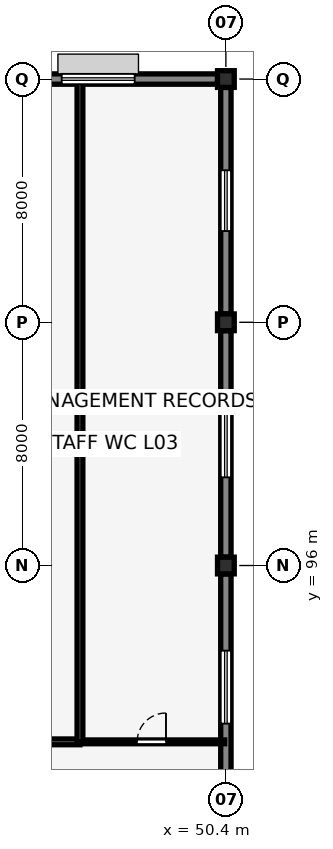
"""IFC4 building model, lengths in metres.
Left out: names, types, materials, properties, quantities, classifications, styles, units other than length and angle.
Written with IfcOpenShell. Run it as: python <this file> out.ifc"""

import sys

from ifc_helpers import new_model, si_unit, direction, frame, frame_2d, origin, origin_2d, place, context, subcontext, project, spatial, rectangle, extrude, element, fill, save


model = new_model("IFC4")
c1 = context("Model", 3, precision=1e-05, world=origin(), true_north=direction((0.0, 1.0)))
c2 = subcontext(c1, "Body", "Model", "MODEL_VIEW")
j1 = project(units=[si_unit("LENGTHUNIT", "METRE"), si_unit("PLANEANGLEUNIT", "RADIAN")], contexts=[c1])
p1 = place(None, origin())
s1 = spatial("IfcSite", under=j1, at=p1, CompositionType="ELEMENT")
p2 = place(p1, origin())
s2 = spatial("IfcBuilding", under=s1, at=p2, CompositionType="ELEMENT")
p3 = place(p2, frame((0.0, 0.0, 13.36)))
s3 = spatial("IfcBuildingStorey", under=s2, at=p3, CompositionType="ELEMENT", Elevation=13.36)
for number, where, z_axis, x_axis in (
    (1, (50.4, 96.0, 0.0), (0.0, 0.0, 1.0), (1.0, 0.0, 0.0)),
    (2, (50.4, 104.0, 0.0), (0.0, 0.0, 1.0), (1.0, 0.0, 0.0)),
    (3, (50.4, 112.0, 0.0), (0.0, 0.0, 1.0), (1.0, 0.0, 0.0)),
):
    element("IfcColumn", number, at=place(p3, frame(where, z_axis=z_axis, x_axis=x_axis)), inside=s3, PredefinedType="COLUMN", context=c2, shape_type="SweptSolid", body=[
        extrude(rectangle(XDim=0.55, YDim=0.55, at=origin_2d()), origin(), (0.0, 0.0, 1.0), 3.58),
    ])
p4 = place(p3, frame((42.275, 112.0, 0.0), z_axis=(0.0, 0.0, 1.0), x_axis=(1.0, 0.0, 0.0)))
e4 = element("IfcWall", 4, at=p4, inside=s3, PredefinedType="SOLIDWALL", context=c2, shape_type="SweptSolid", body=[
    extrude(rectangle(XDim=7.85, YDim=0.34, at=frame_2d((3.925, 0.0))), origin(), (0.0, 0.0, 1.0), 3.28),
])
p5 = place(p4, frame((2.725, 0.0, 0.9), z_axis=(0.0, 0.0, 1.0), x_axis=(1.0, 0.0, 0.0)))
e5 = element("IfcOpeningElement", 5, at=p5, cuts=e4, PredefinedType="OPENING", context=c2, shape_type="SweptSolid", body=[
    extrude(rectangle(XDim=2.4, YDim=1.75, at=frame_2d((1.2, 0.875))), frame((0.0, 0.18, 0.0), z_axis=(0.0, -1.0, 0.0), x_axis=(1.0, 0.0, 0.0)), (0.0, 0.0, 1.0), 0.36),
])
p6 = place(p3, frame((50.4, 88.275, 0.0), z_axis=(0.0, 0.0, 1.0), x_axis=(0.0, 1.0, 0.0)))
e6 = element("IfcWall", 6, at=p6, inside=s3, PredefinedType="SOLIDWALL", context=c2, shape_type="SweptSolid", body=[
    extrude(rectangle(XDim=7.45, YDim=0.34, at=frame_2d((3.725, 0.0))), origin(), (0.0, 0.0, 1.0), 3.28),
])
p7 = place(p6, frame((2.525, 0.0, 0.9), z_axis=(0.0, 0.0, 1.0), x_axis=(1.0, 0.0, 0.0)))
e7 = element("IfcOpeningElement", 7, at=p7, cuts=e6, PredefinedType="OPENING", context=c2, shape_type="SweptSolid", body=[
    extrude(rectangle(XDim=2.4, YDim=1.5, at=frame_2d((1.2, 0.75))), frame((0.0, 0.18, 0.0), z_axis=(0.0, -1.0, 0.0), x_axis=(1.0, 0.0, 0.0)), (0.0, 0.0, 1.0), 0.36),
])
p8 = place(p3, frame((50.4, 96.275, 0.0), z_axis=(0.0, 0.0, 1.0), x_axis=(0.0, 1.0, 0.0)))
e8 = element("IfcWall", 8, at=p8, inside=s3, PredefinedType="SOLIDWALL", context=c2, shape_type="SweptSolid", body=[
    extrude(rectangle(XDim=7.45, YDim=0.34, at=frame_2d((3.725, 0.0))), origin(), (0.0, 0.0, 1.0), 3.28),
])
p9 = place(p8, frame((2.625, 0.0, 0.9), z_axis=(0.0, 0.0, 1.0), x_axis=(1.0, 0.0, 0.0)))
e9 = element("IfcOpeningElement", 9, at=p9, cuts=e8, PredefinedType="OPENING", context=c2, shape_type="SweptSolid", body=[
    extrude(rectangle(XDim=2.2, YDim=1.5, at=frame_2d((1.1, 0.75))), frame((0.0, 0.18, 0.0), z_axis=(0.0, -1.0, 0.0), x_axis=(1.0, 0.0, 0.0)), (0.0, 0.0, 1.0), 0.36),
])
p10 = place(p3, frame((50.4, 104.275, 0.0), z_axis=(0.0, 0.0, 1.0), x_axis=(0.0, 1.0, 0.0)))
e10 = element("IfcWall", 10, at=p10, inside=s3, PredefinedType="SOLIDWALL", context=c2, shape_type="SweptSolid", body=[
    extrude(rectangle(XDim=7.45, YDim=0.34, at=frame_2d((3.725, 0.0))), origin(), (0.0, 0.0, 1.0), 3.28),
])
p11 = place(p10, frame((2.725, 0.0, 0.9), z_axis=(0.0, 0.0, 1.0), x_axis=(1.0, 0.0, 0.0)))
e11 = element("IfcOpeningElement", 11, at=p11, cuts=e10, PredefinedType="OPENING", context=c2, shape_type="SweptSolid", body=[
    extrude(rectangle(XDim=2.0, YDim=1.5, at=frame_2d((1.0, 0.75))), frame((0.0, 0.18, 0.0), z_axis=(0.0, -1.0, 0.0), x_axis=(1.0, 0.0, 0.0)), (0.0, 0.0, 1.0), 0.36),
])
p12 = place(p3, frame((42.0, 90.2, 0.0), z_axis=(0.0, 0.0, 1.0), x_axis=(1.0, 0.0, 0.0)))
e12 = element("IfcWall", 12, at=p12, inside=s3, PredefinedType="PLUMBINGWALL", context=c2, shape_type="SweptSolid", body=[
    extrude(rectangle(XDim=3.6, YDim=0.19, at=frame_2d((1.8, 0.0))), origin(), (0.0, 0.0, 1.0), 3.58),
])
p13 = place(p12, frame((1.3, 0.0, 0.0), z_axis=(0.0, 0.0, 1.0), x_axis=(1.0, 0.0, 0.0)))
e13 = element("IfcOpeningElement", 13, at=p13, cuts=e12, PredefinedType="OPENING", context=c2, shape_type="SweptSolid", body=[
    extrude(rectangle(XDim=0.95, YDim=2.15, at=frame_2d((0.475, 1.075))), frame((0.0, 0.105, 0.0), z_axis=(0.0, -1.0, 0.0), x_axis=(1.0, 0.0, 0.0)), (0.0, 0.0, 1.0), 0.21),
])
p14 = place(p3, frame((45.6, 90.2, 0.0), z_axis=(0.0, 0.0, 1.0), x_axis=(1.0, 0.0, 0.0)))
e14 = element("IfcWall", 14, at=p14, inside=s3, PredefinedType="PARTITIONING", context=c2, shape_type="SweptSolid", body=[
    extrude(rectangle(XDim=4.76, YDim=0.125, at=frame_2d((2.38, 0.0))), origin(), (0.0, 0.0, 1.0), 3.58),
])
p15 = place(p14, frame((1.88, 0.0, 0.0), z_axis=(0.0, 0.0, 1.0), x_axis=(1.0, 0.0, 0.0)))
e15 = element("IfcOpeningElement", 15, at=p15, cuts=e14, PredefinedType="OPENING", context=c2, shape_type="SweptSolid", body=[
    extrude(rectangle(XDim=0.95, YDim=2.15, at=frame_2d((0.475, 1.075))), frame((0.0, 0.073, 0.0), z_axis=(0.0, -1.0, 0.0), x_axis=(1.0, 0.0, 0.0)), (0.0, 0.0, 1.0), 0.145),
])
p16 = place(p3, frame((45.6, 90.2, 0.0), z_axis=(0.0, 0.0, 1.0), x_axis=(0.0, 1.0, 0.0)))
e16 = element("IfcWall", 16, at=p16, inside=s3, PredefinedType="PLUMBINGWALL", context=c2, shape_type="SweptSolid", body=[
    extrude(rectangle(XDim=21.76, YDim=0.19, at=frame_2d((10.88, 0.0))), origin(), (0.0, 0.0, 1.0), 3.58),
])
p17 = place(p5, origin())
e17 = element("IfcWindow", 17, at=p17, inside=s3, PartitioningType="DOUBLE_PANEL_VERTICAL", PredefinedType="WINDOW", context=c2, shape_type="SweptSolid", body=[
    extrude(rectangle(XDim=2.4, YDim=1.75, at=frame_2d((1.2, 0.875))), frame((0.0, 0.03, 0.0), z_axis=(0.0, -1.0, 0.0), x_axis=(1.0, 0.0, 0.0)), (0.0, 0.0, 1.0), 0.06),
])
fill(e5, e17)
p18 = place(p7, origin())
e18 = element("IfcWindow", 18, at=p18, inside=s3, PartitioningType="DOUBLE_PANEL_VERTICAL", PredefinedType="WINDOW", context=c2, shape_type="SweptSolid", body=[
    extrude(rectangle(XDim=2.4, YDim=1.5, at=frame_2d((1.2, 0.75))), frame((0.0, 0.03, 0.0), z_axis=(0.0, -1.0, 0.0), x_axis=(1.0, 0.0, 0.0)), (0.0, 0.0, 1.0), 0.06),
])
fill(e7, e18)
p19 = place(p9, origin())
e19 = element("IfcWindow", 19, at=p19, inside=s3, PartitioningType="DOUBLE_PANEL_VERTICAL", PredefinedType="WINDOW", context=c2, shape_type="SweptSolid", body=[
    extrude(rectangle(XDim=2.2, YDim=1.5, at=frame_2d((1.1, 0.75))), frame((0.0, 0.03, 0.0), z_axis=(0.0, -1.0, 0.0), x_axis=(1.0, 0.0, 0.0)), (0.0, 0.0, 1.0), 0.06),
])
fill(e9, e19)
p20 = place(p11, origin())
e20 = element("IfcWindow", 20, at=p20, inside=s3, PartitioningType="DOUBLE_PANEL_VERTICAL", PredefinedType="WINDOW", context=c2, shape_type="SweptSolid", body=[
    extrude(rectangle(XDim=2.0, YDim=1.5, at=frame_2d((1.0, 0.75))), frame((0.0, 0.03, 0.0), z_axis=(0.0, -1.0, 0.0), x_axis=(1.0, 0.0, 0.0)), (0.0, 0.0, 1.0), 0.06),
])
fill(e11, e20)
p21 = place(p15, origin())
e21 = element("IfcDoor", 21, at=p21, inside=s3, OperationType="SINGLE_SWING_RIGHT", PredefinedType="DOOR", context=c2, shape_type="SweptSolid", body=[
    extrude(rectangle(XDim=0.95, YDim=2.15, at=frame_2d((0.475, 1.075))), frame((0.0, 0.025, 0.0), z_axis=(0.0, -1.0, 0.0), x_axis=(1.0, 0.0, 0.0)), (0.0, 0.0, 1.0), 0.05),
])
fill(e15, e21)
save(model, sys.argv[1])
